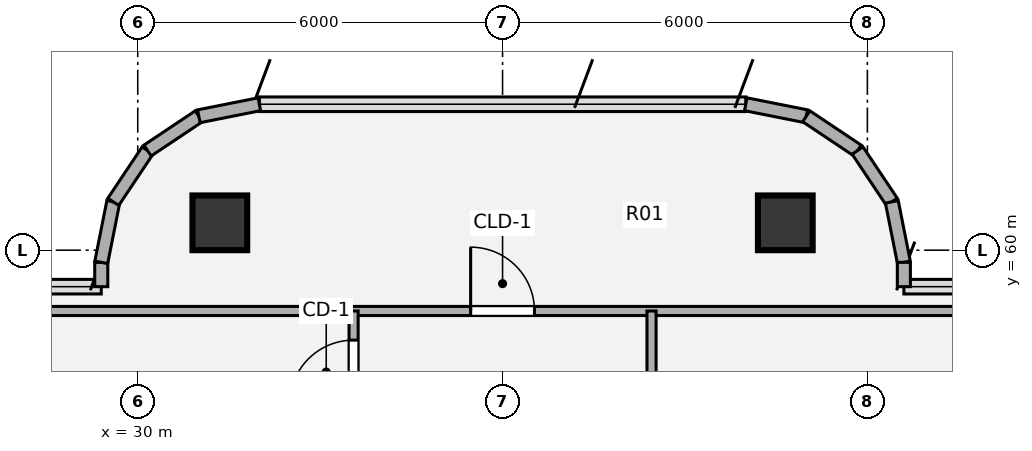
"""IFC4 building model, lengths in metres.
Left out: names, types, materials, properties, quantities, classifications, styles, units other than length and angle.
Written with IfcOpenShell. Run it as: python <this file> out.ifc"""

import sys

from ifc_helpers import new_model, si_unit, direction, frame, frame_2d, origin, origin_2d, place, context, subcontext, project, spatial, rectangle, hollow_circle, extrude, source, transform, mapped, element, fill, save


model = new_model("IFC4")
c1 = context("Model", 3, precision=1e-05, world=origin(), true_north=direction((0.0, 1.0)))
c2 = subcontext(c1, "Body", "Model", "MODEL_VIEW")
j1 = project(units=[si_unit("LENGTHUNIT", "METRE"), si_unit("PLANEANGLEUNIT", "RADIAN")], contexts=[c1])
p1 = place(None, origin())
s1 = spatial("IfcSite", under=j1, at=p1, CompositionType="ELEMENT")
p2 = place(p1, origin())
s2 = spatial("IfcBuilding", under=s1, at=p2, CompositionType="ELEMENT")
p3 = place(p2, frame((0.0, 0.0, 275.94)))
s3 = spatial("IfcBuildingStorey", under=s2, at=p3, CompositionType="ELEMENT", Elevation=275.94)
m1 = source(origin(), c2, "Body", "SweptSolid", [
    extrude(hollow_circle(Radius=0.45, WallThickness=0.032, at=origin_2d()), origin(), (0.0, 0.0, 1.0), 3.78),
])
for number, where, z_axis, x_axis in (
    (1, (31.35, 60.45, 0.0), (0.0, 0.0, 1.0), (1.0, 0.0, 0.0)),
    (2, (40.65, 60.45, 0.0), (0.0, 0.0, 1.0), (1.0, 0.0, 0.0)),
):
    element("IfcColumn", number, at=place(p3, frame(where, z_axis=z_axis, x_axis=x_axis)), inside=s3, PredefinedType="COLUMN", context=c2, shape_type="MappedRepresentation", body=[
        mapped(m1, transform((0.0, 0.0, 0.0), x_axis=(1.0, 0.0, 0.0), y_axis=(0.0, 1.0, 0.0), z_axis=(0.0, 0.0, 1.0), scale=1.0)),
    ])
p4 = place(p3, frame((29.4, 59.4, 0.0), z_axis=(0.0, 0.0, 1.0), x_axis=(0.0, 1.0, 0.0)))
e3 = element("IfcWall", 3, at=p4, inside=s3, PredefinedType="SOLIDWALL", context=c2, shape_type="SweptSolid", body=[
    extrude(rectangle(XDim=0.4, YDim=0.215, at=frame_2d((0.2, 0.0))), origin(), (0.0, 0.0, 1.0), 3.53),
])
p5 = place(p3, frame((29.4, 59.8, 0.0), z_axis=(0.0, 0.0, 1.0), x_axis=(0.195190360752, 0.980765376158, 0.0)))
e4 = element("IfcWall", 4, at=p5, inside=s3, PredefinedType="SOLIDWALL", context=c2, shape_type="SweptSolid", body=[
    extrude(rectangle(XDim=1.014, YDim=0.215, at=frame_2d((0.507, 0.0))), origin(), (0.0, 0.0, 1.0), 3.53),
])
p6 = place(p3, frame((29.598, 60.795, 0.0), z_axis=(0.0, 0.0, 1.0), x_axis=(0.555643898837, 0.831420385657, 0.0)))
e5 = element("IfcWall", 5, at=p6, inside=s3, PredefinedType="SOLIDWALL", context=c2, shape_type="SweptSolid", body=[
    extrude(rectangle(XDim=1.015, YDim=0.215, at=frame_2d((0.507, 0.0))), origin(), (0.0, 0.0, 1.0), 3.53),
])
p7 = place(p3, frame((30.162, 61.638, 0.0), z_axis=(0.0, 0.0, 1.0), x_axis=(0.831346067305, 0.555755086685, 0.0)))
e6 = element("IfcWall", 6, at=p7, inside=s3, PredefinedType="SOLIDWALL", context=c2, shape_type="SweptSolid", body=[
    extrude(rectangle(XDim=1.014, YDim=0.215, at=frame_2d((0.507, 0.0))), origin(), (0.0, 0.0, 1.0), 3.53),
])
for number, where, z_axis, x_axis in (
    (7, (31.005, 62.202, 0.0), (0.0, 0.0, 1.0), (0.981, 0.195, 0.0)),
    (8, (40.0, 62.4, 0.0), (0.0, 0.0, 1.0), (0.981, -0.195, 0.0)),
):
    element("IfcWall", number, at=place(p3, frame(where, z_axis=z_axis, x_axis=x_axis)), inside=s3, PredefinedType="SOLIDWALL", context=c2, shape_type="SweptSolid", body=[
        extrude(rectangle(XDim=1.015, YDim=0.215, at=frame_2d((0.507, 0.0))), origin(), (0.0, 0.0, 1.0), 3.53),
    ])
p8 = place(p3, frame((40.995, 62.202, 0.0), z_axis=(0.0, 0.0, 1.0), x_axis=(0.831346067305, -0.555755086685, 0.0)))
e9 = element("IfcWall", 9, at=p8, inside=s3, PredefinedType="SOLIDWALL", context=c2, shape_type="SweptSolid", body=[
    extrude(rectangle(XDim=1.014, YDim=0.215, at=frame_2d((0.507, 0.0))), origin(), (0.0, 0.0, 1.0), 3.53),
])
p9 = place(p3, frame((41.838, 61.638, 0.0), z_axis=(0.0, 0.0, 1.0), x_axis=(0.555643898837, -0.831420385657, 0.0)))
e10 = element("IfcWall", 10, at=p9, inside=s3, PredefinedType="SOLIDWALL", context=c2, shape_type="SweptSolid", body=[
    extrude(rectangle(XDim=1.015, YDim=0.215, at=frame_2d((0.507, 0.0))), origin(), (0.0, 0.0, 1.0), 3.53),
])
p10 = place(p3, frame((42.402, 60.795, 0.0), z_axis=(0.0, 0.0, 1.0), x_axis=(0.195190360752, -0.980765376158, 0.0)))
e11 = element("IfcWall", 11, at=p10, inside=s3, PredefinedType="SOLIDWALL", context=c2, shape_type="SweptSolid", body=[
    extrude(rectangle(XDim=1.014, YDim=0.215, at=frame_2d((0.507, 0.0))), origin(), (0.0, 0.0, 1.0), 3.53),
])
p11 = place(p3, frame((42.6, 59.8, 0.0), z_axis=(0.0, 0.0, 1.0), x_axis=(0.0, -1.0, 0.0)))
e12 = element("IfcWall", 12, at=p11, inside=s3, PredefinedType="SOLIDWALL", context=c2, shape_type="SweptSolid", body=[
    extrude(rectangle(XDim=0.4, YDim=0.215, at=frame_2d((0.2, 0.0))), origin(), (0.0, 0.0, 1.0), 3.53),
])
p12 = place(p3, frame((27.1, 59.0, 0.0), z_axis=(0.0, 0.0, 1.0), x_axis=(1.0, 0.0, 0.0)))
e13 = element("IfcWall", 13, at=p12, inside=s3, PredefinedType="PARTITIONING", context=c2, shape_type="SweptSolid", body=[
    extrude(rectangle(XDim=17.8, YDim=0.15, at=frame_2d((8.9, 0.0))), origin(), (0.0, 0.0, 1.0), 3.308),
])
p13 = place(p12, frame((8.375, 0.0, 0.0)))
e14 = element("IfcOpeningElement", 14, at=p13, cuts=e13, PredefinedType="OPENING", context=c2, shape_type="SweptSolid", body=[
    extrude(rectangle(XDim=1.05, YDim=2.1, at=origin_2d()), frame((0.525, 0.085, 1.05), z_axis=(0.0, -1.0, 0.0), x_axis=(1.0, 0.0, 0.0)), (0.0, 0.0, 1.0), 0.17),
])
p14 = place(p3, frame((33.55, 56.982, 0.0), z_axis=(0.0, 0.0, 1.0), x_axis=(0.0, 1.0, 0.0)))
e15 = element("IfcWall", 15, at=p14, inside=s3, PredefinedType="PARTITIONING", context=c2, shape_type="SweptSolid", body=[
    extrude(rectangle(XDim=2.018, YDim=0.15, at=frame_2d((1.009, 0.0))), origin(), (0.0, 0.0, 1.0), 3.5),
])
p15 = place(p14, frame((0.489, 0.0, 0.0)))
e16 = element("IfcOpeningElement", 16, at=p15, cuts=e15, PredefinedType="OPENING", context=c2, shape_type="SweptSolid", body=[
    extrude(rectangle(XDim=1.05, YDim=2.1, at=origin_2d()), frame((0.525, 0.085, 1.05), z_axis=(0.0, -1.0, 0.0), x_axis=(1.0, 0.0, 0.0)), (0.0, 0.0, 1.0), 0.17),
])
p16 = place(p3, frame((38.45, 52.04, 0.0), z_axis=(0.0, 0.0, 1.0), x_axis=(0.0, 1.0, 0.0)))
e17 = element("IfcWall", 17, at=p16, inside=s3, PredefinedType="PARTITIONING", context=c2, shape_type="SweptSolid", body=[
    extrude(rectangle(XDim=6.96, YDim=0.15, at=frame_2d((3.48, 0.0))), origin(), (0.0, 0.0, 1.0), 3.5),
])
p17 = place(p16, frame((2.955, 0.0, 0.0)))
e18 = element("IfcOpeningElement", 18, at=p17, cuts=e17, PredefinedType="OPENING", context=c2, shape_type="SweptSolid", body=[
    extrude(rectangle(XDim=1.05, YDim=2.1, at=origin_2d()), frame((0.525, 0.085, 1.05), z_axis=(0.0, -1.0, 0.0), x_axis=(1.0, 0.0, 0.0)), (0.0, 0.0, 1.0), 0.17),
])
m2 = source(origin(), c2, "Body", "SweptSolid", [
    extrude(rectangle(XDim=1.05, YDim=2.1, at=origin_2d()), frame((0.525, 0.025, 1.05), z_axis=(0.0, -1.0, 0.0), x_axis=(1.0, 0.0, 0.0)), (0.0, 0.0, 1.0), 0.05),
])
p18 = place(p13, origin())
e19 = element("IfcDoor", 19, at=p18, inside=s3, OperationType="SINGLE_SWING_LEFT", PredefinedType="DOOR", context=c2, shape_type="MappedRepresentation", body=[
    mapped(m2, transform((0.0, 0.0, 0.0), x_axis=(1.0, 0.0, 0.0), y_axis=(0.0, 1.0, 0.0), z_axis=(0.0, 0.0, 1.0), scale=1.0)),
])
fill(e14, e19)
m3 = source(origin(), c2, "Body", "SweptSolid", [
    extrude(rectangle(XDim=1.05, YDim=2.1, at=origin_2d()), frame((0.525, 0.025, 1.05), z_axis=(0.0, -1.0, 0.0), x_axis=(1.0, 0.0, 0.0)), (0.0, 0.0, 1.0), 0.05),
])
p19 = place(p15, origin())
e20 = element("IfcDoor", 20, at=p19, inside=s3, OperationType="SINGLE_SWING_LEFT", PredefinedType="DOOR", context=c2, shape_type="MappedRepresentation", body=[
    mapped(m3, transform((0.0, 0.0, 0.0), x_axis=(1.0, 0.0, 0.0), y_axis=(0.0, 1.0, 0.0), z_axis=(0.0, 0.0, 1.0), scale=1.0)),
])
fill(e16, e20)
save(model, sys.argv[1])
